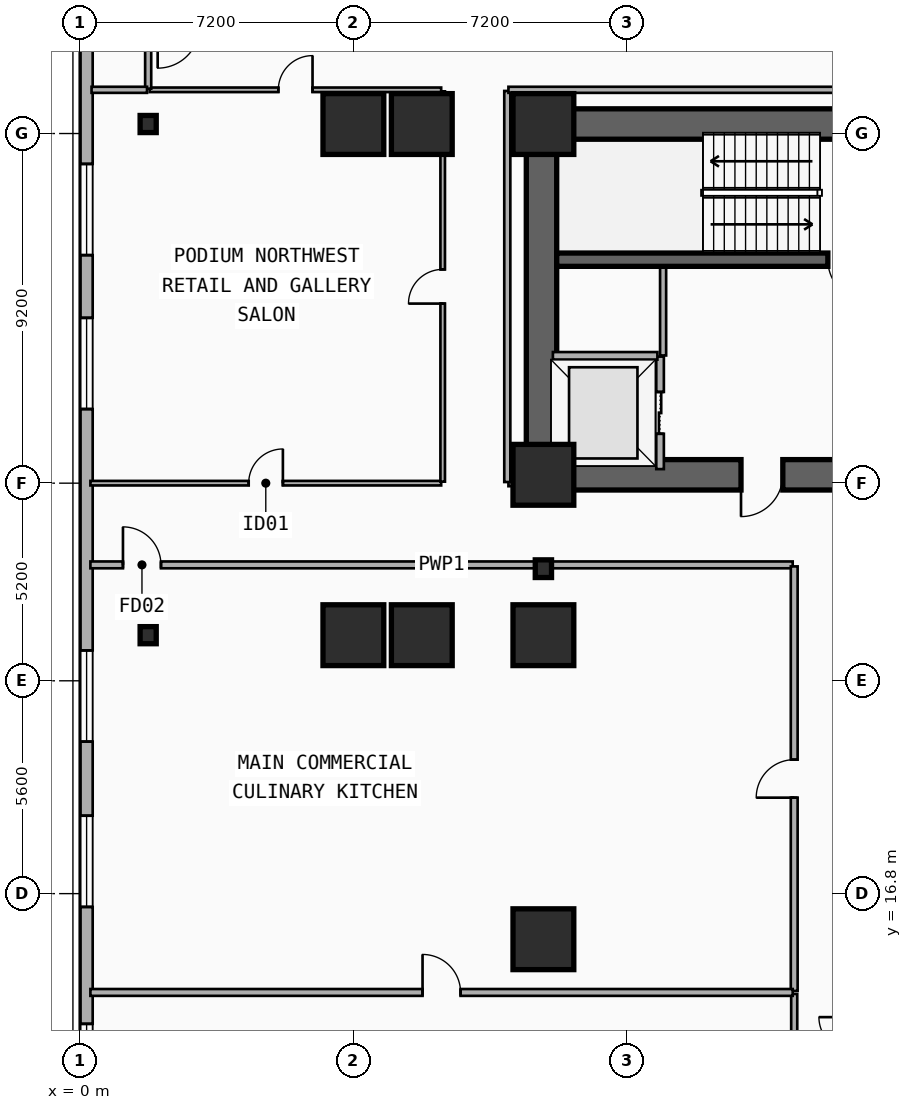
"""IFC4 building model, lengths in metres.
Left out: names, types, materials, properties, quantities, classifications, styles, units other than length and angle.
Written with IfcOpenShell. Run it as: python <this file> out.ifc"""

import sys

from ifc_helpers import new_model, si_unit, direction, frame, frame_2d, origin, origin_2d, place, context, subcontext, project, spatial, rectangle, i_section, extrude, element, fill, save


model = new_model("IFC4")
c1 = context("Model", 3, precision=1e-05, world=origin(), true_north=direction((0.0, 1.0)))
c2 = subcontext(c1, "Body", "Model", "MODEL_VIEW")
j1 = project(units=[si_unit("LENGTHUNIT", "METRE"), si_unit("PLANEANGLEUNIT", "RADIAN")], contexts=[c1])
p1 = place(None, origin())
s1 = spatial("IfcSite", under=j1, at=p1, CompositionType="ELEMENT")
p2 = place(p1, origin())
s2 = spatial("IfcBuilding", under=s1, at=p2, CompositionType="ELEMENT")
p3 = place(p2, frame((0.0, 0.0, 14.9)))
s3 = spatial("IfcBuildingStorey", under=s2, at=p3, CompositionType="ELEMENT", Elevation=14.9)
p4 = place(p3, frame((12.15, 37.05, 0.0), z_axis=(0.0, 0.0, 1.0), x_axis=(1.0, 0.0, 0.0)))
e1 = element("IfcWall", 1, at=p4, inside=s3, PredefinedType="SHEAR", context=c2, shape_type="SweptSolid", body=[
    extrude(rectangle(XDim=33.23, YDim=0.8, at=frame_2d((16.615, 0.0))), origin(), (0.0, 0.0, 1.0), 4.5),
])
p5 = place(p3, frame((21.18, 27.82, 0.0), z_axis=(0.0, 0.0, 1.0), x_axis=(-1.0, 0.0, 0.0)))
e2 = element("IfcWall", 2, at=p5, inside=s3, PredefinedType="SHEAR", context=c2, shape_type="SweptSolid", body=[
    extrude(rectangle(XDim=9.03, YDim=0.8, at=frame_2d((4.515, 0.0))), origin(), (0.0, 0.0, 1.0), 4.5),
])
p6 = place(p5, frame((2.68, 0.0, 0.0)))
e3 = element("IfcOpeningElement", 3, at=p6, cuts=e2, PredefinedType="OPENING", context=c2, shape_type="SweptSolid", body=[
    extrude(rectangle(XDim=1.1, YDim=2.15, at=frame_2d((0.55, 1.075))), frame((0.0, 0.41, 0.0), z_axis=(0.0, -1.0, 0.0), x_axis=(1.0, 0.0, 0.0)), (0.0, 0.0, 1.0), 0.82),
])
p7 = place(p3, frame((12.15, 28.22, 0.0), z_axis=(0.0, 0.0, 1.0), x_axis=(0.0, 1.0, 0.0)))
e4 = element("IfcWall", 4, at=p7, inside=s3, PredefinedType="SHEAR", context=c2, shape_type="SweptSolid", body=[
    extrude(rectangle(XDim=8.43, YDim=0.8, at=frame_2d((4.215, 0.0))), origin(), (0.0, 0.0, 1.0), 4.5),
])
p8 = place(p3, frame((21.005, 33.48, 0.0), z_axis=(0.0, 0.0, 1.0), x_axis=(-1.0, 0.0, 0.0)))
e5 = element("IfcWall", 5, at=p8, inside=s3, PredefinedType="SHEAR", context=c2, shape_type="SweptSolid", body=[
    extrude(rectangle(XDim=8.455, YDim=0.35, at=frame_2d((4.228, 0.0))), origin(), (0.0, 0.0, 1.0), 4.5),
])
p9 = place(p8, frame((0.22, 0.0, 0.0)))
e6 = element("IfcOpeningElement", 6, at=p9, cuts=e5, PredefinedType="OPENING", context=c2, shape_type="SweptSolid", body=[
    extrude(rectangle(XDim=1.1, YDim=2.15, at=frame_2d((0.55, 1.075))), frame((0.0, 0.185, 0.0), z_axis=(0.0, -1.0, 0.0), x_axis=(1.0, 0.0, 0.0)), (0.0, 0.0, 1.0), 0.37),
])
for number, where, z_axis, x_axis in (
    (7, (12.2, 27.82, 0.0), (0.0, 0.0, 1.0), (1.0, 0.0, 0.0)),
    (8, (12.2, 37.05, 0.0), (0.0, 0.0, 1.0), (1.0, 0.0, 0.0)),
):
    element("IfcColumn", number, at=place(p3, frame(where, z_axis=z_axis, x_axis=x_axis)), inside=s3, PredefinedType="COLUMN", context=c2, shape_type="SweptSolid", body=[
        extrude(rectangle(XDim=1.6, YDim=1.6, at=origin_2d()), origin(), (0.0, 0.0, 1.0), 4.5),
    ])
p10 = place(p3, frame((12.2, 25.35, 0.0), z_axis=(0.0, 0.0, 1.0), x_axis=(1.0, 0.0, 0.0)))
e9 = element("IfcColumn", 9, at=p10, inside=s3, PredefinedType="COLUMN", context=c2, shape_type="SweptSolid", body=[
    extrude(i_section(OverallWidth=0.428, OverallDepth=0.465, WebThickness=0.045, FlangeThickness=0.073, FilletRadius=0.015, at=origin_2d()), origin(), (0.0, 0.0, 1.0), 4.5),
])
for number, where, z_axis, x_axis in (
    (10, (1.8, 23.6, 0.0), (0.0, 0.0, 1.0), (1.0, 0.0, 0.0)),
    (11, (1.8, 37.05, 0.0), (0.0, 0.0, 1.0), (1.0, 0.0, 0.0)),
):
    element("IfcColumn", number, at=place(p3, frame(where, z_axis=z_axis, x_axis=x_axis)), inside=s3, PredefinedType="COLUMN", context=c2, shape_type="SweptSolid", body=[
        extrude(i_section(OverallWidth=0.424, OverallDepth=0.45, WebThickness=0.041, FlangeThickness=0.065, FilletRadius=0.015, at=origin_2d()), origin(), (0.0, 0.0, 1.0), 4.5),
    ])
for number, where, z_axis, x_axis in (
    (12, (7.2, 23.6, 0.0), (0.0, 0.0, 1.0), (1.0, 0.0, 0.0)),
    (13, (7.2, 37.05, 0.0), (0.0, 0.0, 1.0), (1.0, 0.0, 0.0)),
    (14, (9.0, 23.6, 0.0), (0.0, 0.0, 1.0), (1.0, 0.0, 0.0)),
    (15, (9.0, 37.05, 0.0), (0.0, 0.0, 1.0), (1.0, 0.0, 0.0)),
    (16, (12.2, 15.6, 0.0), (0.0, 0.0, 1.0), (1.0, 0.0, 0.0)),
    (17, (12.2, 23.6, 0.0), (0.0, 0.0, 1.0), (1.0, 0.0, 0.0)),
):
    element("IfcColumn", number, at=place(p3, frame(where, z_axis=z_axis, x_axis=x_axis)), inside=s3, PredefinedType="COLUMN", context=c2, shape_type="SweptSolid", body=[
        extrude(rectangle(XDim=1.6, YDim=1.6, at=origin_2d()), origin(), (0.0, 0.0, 1.0), 4.5),
    ])
p11 = place(p3, frame((0.18, 7.2, 0.0), z_axis=(0.0, 0.0, 1.0), x_axis=(0.0, 1.0, 0.0)))
e18 = element("IfcWall", 18, at=p11, inside=s3, PredefinedType="SOLIDWALL", context=c2, shape_type="SweptSolid", body=[
    extrude(rectangle(XDim=34.4, YDim=0.32, at=frame_2d((17.2, 0.0))), origin(), (0.0, 0.0, 1.0), 4.2),
])
p12 = place(p11, frame((22.35, 0.0, 0.9)))
e19 = element("IfcOpeningElement", 19, at=p12, cuts=e18, PredefinedType="OPENING", context=c2, shape_type="SweptSolid", body=[
    extrude(rectangle(XDim=2.4, YDim=1.8, at=frame_2d((1.2, 0.9))), frame((0.0, 0.17, 0.0), z_axis=(0.0, -1.0, 0.0), x_axis=(1.0, 0.0, 0.0)), (0.0, 0.0, 1.0), 0.34),
])
p13 = place(p11, frame((26.4, 0.0, 0.9)))
e20 = element("IfcOpeningElement", 20, at=p13, cuts=e18, PredefinedType="OPENING", context=c2, shape_type="SweptSolid", body=[
    extrude(rectangle(XDim=2.4, YDim=1.8, at=frame_2d((1.2, 0.9))), frame((0.0, 0.17, 0.0), z_axis=(0.0, -1.0, 0.0), x_axis=(1.0, 0.0, 0.0)), (0.0, 0.0, 1.0), 0.34),
])
p14 = place(p11, frame((0.847, 0.0, 0.9)))
e21 = element("IfcOpeningElement", 21, at=p14, cuts=e18, PredefinedType="OPENING", context=c2, shape_type="SweptSolid", body=[
    extrude(rectangle(XDim=2.4, YDim=1.8, at=frame_2d((1.2, 0.9))), frame((0.0, 0.17, 0.0), z_axis=(0.0, -1.0, 0.0), x_axis=(1.0, 0.0, 0.0)), (0.0, 0.0, 1.0), 0.34),
])
p15 = place(p11, frame((3.773, 0.0, 0.9)))
e22 = element("IfcOpeningElement", 22, at=p15, cuts=e18, PredefinedType="OPENING", context=c2, shape_type="SweptSolid", body=[
    extrude(rectangle(XDim=2.4, YDim=1.8, at=frame_2d((1.2, 0.9))), frame((0.0, 0.17, 0.0), z_axis=(0.0, -1.0, 0.0), x_axis=(1.0, 0.0, 0.0)), (0.0, 0.0, 1.0), 0.34),
])
p16 = place(p11, frame((9.25, 0.0, 0.9)))
e23 = element("IfcOpeningElement", 23, at=p16, cuts=e18, PredefinedType="OPENING", context=c2, shape_type="SweptSolid", body=[
    extrude(rectangle(XDim=2.4, YDim=1.8, at=frame_2d((1.2, 0.9))), frame((0.0, 0.17, 0.0), z_axis=(0.0, -1.0, 0.0), x_axis=(1.0, 0.0, 0.0)), (0.0, 0.0, 1.0), 0.34),
])
p17 = place(p11, frame((13.6, 0.0, 0.9)))
e24 = element("IfcOpeningElement", 24, at=p17, cuts=e18, PredefinedType="OPENING", context=c2, shape_type="SweptSolid", body=[
    extrude(rectangle(XDim=2.4, YDim=1.8, at=frame_2d((1.2, 0.9))), frame((0.0, 0.17, 0.0), z_axis=(0.0, -1.0, 0.0), x_axis=(1.0, 0.0, 0.0)), (0.0, 0.0, 1.0), 0.34),
])
p18 = place(p3, frame((15.27, 27.97, 0.0), z_axis=(0.0, 0.0, 1.0), x_axis=(0.0, 1.0, 0.0)))
e25 = element("IfcWall", 25, at=p18, inside=s3, PredefinedType="PARTITIONING", context=c2, shape_type="SweptSolid", body=[
    extrude(rectangle(XDim=2.96, YDim=0.2, at=frame_2d((1.48, 0.0))), origin(), (0.0, 0.0, 1.0), 3.172),
])
p19 = place(p18, frame((0.93, 0.0, 0.0)))
e26 = element("IfcOpeningElement", 26, at=p19, cuts=e25, PredefinedType="OPENING", context=c2, shape_type="SweptSolid", body=[
    extrude(rectangle(XDim=1.1, YDim=2.15, at=frame_2d((0.55, 1.075))), frame((0.0, 0.11, 0.0), z_axis=(0.0, -1.0, 0.0), x_axis=(1.0, 0.0, 0.0)), (0.0, 0.0, 1.0), 0.22),
])
p20 = place(p3, frame((12.45, 30.95, 0.0), z_axis=(0.0, 0.0, 1.0), x_axis=(1.0, 0.0, 0.0)))
e27 = element("IfcWall", 27, at=p20, inside=s3, PredefinedType="PARTITIONING", context=c2, shape_type="SweptSolid", body=[
    extrude(rectangle(XDim=2.75, YDim=0.2, at=frame_2d((1.375, 0.0))), origin(), (0.0, 0.0, 1.0), 3.172),
])
p21 = place(p3, frame((0.28, 27.6, 0.0), z_axis=(0.0, 0.0, 1.0), x_axis=(1.0, 0.0, 0.0)))
e28 = element("IfcWall", 28, at=p21, inside=s3, PredefinedType="PARTITIONING", context=c2, shape_type="SweptSolid", body=[
    extrude(rectangle(XDim=9.23, YDim=0.12, at=frame_2d((4.615, 0.0))), origin(), (0.0, 0.0, 1.0), 4.2),
])
p22 = place(p21, frame((4.165, 0.0, 0.0)))
e29 = element("IfcOpeningElement", 29, at=p22, cuts=e28, PredefinedType="OPENING", context=c2, shape_type="SweptSolid", body=[
    extrude(rectangle(XDim=0.9, YDim=2.1, at=frame_2d((0.45, 1.05))), frame((0.0, 0.07, 0.0), z_axis=(0.0, -1.0, 0.0), x_axis=(1.0, 0.0, 0.0)), (0.0, 0.0, 1.0), 0.14),
])
p23 = place(p3, frame((0.28, 25.45, 0.0), z_axis=(0.0, 0.0, 1.0), x_axis=(1.0, 0.0, 0.0)))
e30 = element("IfcWall", 30, at=p23, inside=s3, PredefinedType="PLUMBINGWALL", context=c2, shape_type="SweptSolid", body=[
    extrude(rectangle(XDim=18.48, YDim=0.18, at=frame_2d((9.24, 0.0))), origin(), (0.0, 0.0, 1.0), 3.366),
])
p24 = place(p23, frame((0.857, 0.0, 0.0)))
e31 = element("IfcOpeningElement", 31, at=p24, cuts=e30, PredefinedType="OPENING", context=c2, shape_type="SweptSolid", body=[
    extrude(rectangle(XDim=1.0, YDim=2.15, at=frame_2d((0.5, 1.075))), frame((0.0, 0.1, 0.0), z_axis=(0.0, -1.0, 0.0), x_axis=(1.0, 0.0, 0.0)), (0.0, 0.0, 1.0), 0.2),
])
p25 = place(p3, frame((9.55, 27.64, 0.0), z_axis=(0.0, 0.0, 1.0), x_axis=(0.0, 1.0, 0.0)))
e32 = element("IfcWall", 32, at=p25, inside=s3, PredefinedType="PARTITIONING", context=c2, shape_type="SweptSolid", body=[
    extrude(rectangle(XDim=10.27, YDim=0.12, at=frame_2d((5.135, 0.0))), origin(), (0.0, 0.0, 1.0), 4.2),
])
p26 = place(p25, frame((4.685, 0.0, 0.0)))
e33 = element("IfcOpeningElement", 33, at=p26, cuts=e32, PredefinedType="OPENING", context=c2, shape_type="SweptSolid", body=[
    extrude(rectangle(XDim=0.9, YDim=2.1, at=frame_2d((0.45, 1.05))), frame((0.0, 0.07, 0.0), z_axis=(0.0, -1.0, 0.0), x_axis=(1.0, 0.0, 0.0)), (0.0, 0.0, 1.0), 0.14),
])
p27 = place(p3, frame((1.84, 37.95, 0.0), z_axis=(0.0, 0.0, 1.0), x_axis=(1.0, 0.0, 0.0)))
e34 = element("IfcWall", 34, at=p27, inside=s3, PredefinedType="PARTITIONING", context=c2, shape_type="SweptSolid", body=[
    extrude(rectangle(XDim=7.67, YDim=0.12, at=frame_2d((3.835, 0.0))), origin(), (0.0, 0.0, 1.0), 4.2),
])
p28 = place(p27, frame((3.385, 0.0, 0.0)))
e35 = element("IfcOpeningElement", 35, at=p28, cuts=e34, PredefinedType="OPENING", context=c2, shape_type="SweptSolid", body=[
    extrude(rectangle(XDim=0.9, YDim=2.1, at=frame_2d((0.45, 1.05))), frame((0.0, 0.07, 0.0), z_axis=(0.0, -1.0, 0.0), x_axis=(1.0, 0.0, 0.0)), (0.0, 0.0, 1.0), 0.14),
])
p29 = place(p3, frame((18.8, 12.04, 0.0), z_axis=(0.0, 0.0, 1.0), x_axis=(0.0, 1.0, 0.0)))
e36 = element("IfcWall", 36, at=p29, inside=s3, PredefinedType="PARTITIONING", context=c2, shape_type="SweptSolid", body=[
    extrude(rectangle(XDim=2.12, YDim=0.16, at=frame_2d((1.06, 0.0))), origin(), (0.0, 0.0, 1.0), 3.82),
])
p30 = place(p3, frame((18.8, 14.24, 0.0), z_axis=(0.0, 0.0, 1.0), x_axis=(0.0, 1.0, 0.0)))
e37 = element("IfcWall", 37, at=p30, inside=s3, PredefinedType="PLUMBINGWALL", context=c2, shape_type="SweptSolid", body=[
    extrude(rectangle(XDim=11.17, YDim=0.18, at=frame_2d((5.585, 0.0))), origin(), (0.0, 0.0, 1.0), 3.172),
])
p31 = place(p30, frame((5.085, 0.0, 0.0)))
e38 = element("IfcOpeningElement", 38, at=p31, cuts=e37, PredefinedType="OPENING", context=c2, shape_type="SweptSolid", body=[
    extrude(rectangle(XDim=1.0, YDim=2.15, at=frame_2d((0.5, 1.075))), frame((0.0, 0.1, 0.0), z_axis=(0.0, -1.0, 0.0), x_axis=(1.0, 0.0, 0.0)), (0.0, 0.0, 1.0), 0.2),
])
p32 = place(p3, frame((0.28, 14.2, 0.0), z_axis=(0.0, 0.0, 1.0), x_axis=(1.0, 0.0, 0.0)))
e39 = element("IfcWall", 39, at=p32, inside=s3, PredefinedType="PLUMBINGWALL", context=c2, shape_type="SweptSolid", body=[
    extrude(rectangle(XDim=18.48, YDim=0.18, at=frame_2d((9.24, 0.0))), origin(), (0.0, 0.0, 1.0), 3.366),
])
p33 = place(p32, frame((8.74, 0.0, 0.0)))
e40 = element("IfcOpeningElement", 40, at=p33, cuts=e39, PredefinedType="OPENING", context=c2, shape_type="SweptSolid", body=[
    extrude(rectangle(XDim=1.0, YDim=2.15, at=frame_2d((0.5, 1.075))), frame((0.0, 0.1, 0.0), z_axis=(0.0, -1.0, 0.0), x_axis=(1.0, 0.0, 0.0)), (0.0, 0.0, 1.0), 0.2),
])
p34 = place(p3, frame((15.35, 30.96, 0.0), z_axis=(0.0, 0.0, 1.0), x_axis=(0.0, 1.0, 0.0)))
e41 = element("IfcWall", 41, at=p34, inside=s3, PredefinedType="PARTITIONING", context=c2, shape_type="SweptSolid", body=[
    extrude(rectangle(XDim=2.31, YDim=0.16, at=frame_2d((1.155, 0.0))), origin(), (0.0, 0.0, 1.0), 4.2),
])
p35 = place(p3, frame((11.28, 27.6, 0.0), z_axis=(0.0, 0.0, 1.0), x_axis=(1.0, 0.0, 0.0)))
e42 = element("IfcWall", 42, at=p35, inside=s3, PredefinedType="PARTITIONING", context=c2, shape_type="SweptSolid", body=[
    extrude(rectangle(XDim=0.84, YDim=0.16, at=frame_2d((0.42, 0.0))), origin(), (0.0, 0.0, 1.0), 3.172),
])
p36 = place(p3, frame((11.25, 27.63, 0.0), z_axis=(0.0, 0.0, 1.0), x_axis=(0.0, 1.0, 0.0)))
e43 = element("IfcWall", 43, at=p36, inside=s3, PredefinedType="PARTITIONING", context=c2, shape_type="SweptSolid", body=[
    extrude(rectangle(XDim=10.29, YDim=0.16, at=frame_2d((5.145, 0.0))), origin(), (0.0, 0.0, 1.0), 4.2),
])
p37 = place(p3, frame((11.28, 37.95, 0.0), z_axis=(0.0, 0.0, 1.0), x_axis=(1.0, 0.0, 0.0)))
e44 = element("IfcWall", 44, at=p37, inside=s3, PredefinedType="PARTITIONING", context=c2, shape_type="SweptSolid", body=[
    extrude(rectangle(XDim=35.04, YDim=0.16, at=frame_2d((17.52, 0.0))), origin(), (0.0, 0.0, 1.0), 3.53),
])
p38 = place(p3, frame((1.8, 37.98, 0.0), z_axis=(0.0, 0.0, 1.0), x_axis=(0.0, 1.0, 0.0)))
e45 = element("IfcWall", 45, at=p38, inside=s3, PredefinedType="PARTITIONING", context=c2, shape_type="SweptSolid", body=[
    extrude(rectangle(XDim=1.785, YDim=0.16, at=frame_2d((0.893, 0.0))), origin(), (0.0, 0.0, 1.0), 4.2),
])
p39 = place(p3, frame((0.31, 37.95, 0.0), z_axis=(0.0, 0.0, 1.0), x_axis=(1.0, 0.0, 0.0)))
e46 = element("IfcWall", 46, at=p39, inside=s3, PredefinedType="PARTITIONING", context=c2, shape_type="SweptSolid", body=[
    extrude(rectangle(XDim=1.46, YDim=0.16, at=frame_2d((0.73, 0.0))), origin(), (0.0, 0.0, 1.0), 4.2),
])
p40 = place(p12, origin())
e47 = element("IfcWindow", 47, at=p40, inside=s3, PartitioningType="SINGLE_PANEL", PredefinedType="WINDOW", context=c2, shape_type="SweptSolid", body=[
    extrude(rectangle(XDim=2.4, YDim=1.8, at=frame_2d((1.2, 0.9))), frame((0.0, 0.03, 0.0), z_axis=(0.0, -1.0, 0.0), x_axis=(1.0, 0.0, 0.0)), (0.0, 0.0, 1.0), 0.06),
])
fill(e19, e47)
p41 = place(p13, origin())
e48 = element("IfcWindow", 48, at=p41, inside=s3, PartitioningType="SINGLE_PANEL", PredefinedType="WINDOW", context=c2, shape_type="SweptSolid", body=[
    extrude(rectangle(XDim=2.4, YDim=1.8, at=frame_2d((1.2, 0.9))), frame((0.0, 0.03, 0.0), z_axis=(0.0, -1.0, 0.0), x_axis=(1.0, 0.0, 0.0)), (0.0, 0.0, 1.0), 0.06),
])
fill(e20, e48)
p42 = place(p15, origin())
e49 = element("IfcWindow", 49, at=p42, inside=s3, PartitioningType="SINGLE_PANEL", PredefinedType="WINDOW", context=c2, shape_type="SweptSolid", body=[
    extrude(rectangle(XDim=2.4, YDim=1.8, at=frame_2d((1.2, 0.9))), frame((0.0, 0.03, 0.0), z_axis=(0.0, -1.0, 0.0), x_axis=(1.0, 0.0, 0.0)), (0.0, 0.0, 1.0), 0.06),
])
fill(e22, e49)
p43 = place(p16, origin())
e50 = element("IfcWindow", 50, at=p43, inside=s3, PartitioningType="SINGLE_PANEL", PredefinedType="WINDOW", context=c2, shape_type="SweptSolid", body=[
    extrude(rectangle(XDim=2.4, YDim=1.8, at=frame_2d((1.2, 0.9))), frame((0.0, 0.03, 0.0), z_axis=(0.0, -1.0, 0.0), x_axis=(1.0, 0.0, 0.0)), (0.0, 0.0, 1.0), 0.06),
])
fill(e23, e50)
p44 = place(p17, origin())
e51 = element("IfcWindow", 51, at=p44, inside=s3, PartitioningType="SINGLE_PANEL", PredefinedType="WINDOW", context=c2, shape_type="SweptSolid", body=[
    extrude(rectangle(XDim=2.4, YDim=1.8, at=frame_2d((1.2, 0.9))), frame((0.0, 0.03, 0.0), z_axis=(0.0, -1.0, 0.0), x_axis=(1.0, 0.0, 0.0)), (0.0, 0.0, 1.0), 0.06),
])
fill(e24, e51)
p45 = place(p19, origin())
e52 = element("IfcDoor", 52, at=p45, inside=s3, OperationType="DOUBLE_DOOR_SLIDING", PredefinedType="DOOR", context=c2, shape_type="SweptSolid", body=[
    extrude(rectangle(XDim=1.1, YDim=2.15, at=frame_2d((0.55, 1.075))), frame((0.0, 0.025, 0.0), z_axis=(0.0, -1.0, 0.0), x_axis=(1.0, 0.0, 0.0)), (0.0, 0.0, 1.0), 0.05),
])
fill(e26, e52)
p46 = place(p9, origin())
e53 = element("IfcDoor", 53, at=p46, inside=s3, OperationType="SINGLE_SWING_LEFT", PredefinedType="DOOR", context=c2, shape_type="SweptSolid", body=[
    extrude(rectangle(XDim=1.1, YDim=2.15, at=frame_2d((0.55, 1.075))), frame((0.0, 0.025, 0.0), z_axis=(0.0, -1.0, 0.0), x_axis=(1.0, 0.0, 0.0)), (0.0, 0.0, 1.0), 0.05),
])
fill(e6, e53)
p47 = place(p6, origin())
e54 = element("IfcDoor", 54, at=p47, inside=s3, OperationType="SINGLE_SWING_RIGHT", PredefinedType="DOOR", context=c2, shape_type="SweptSolid", body=[
    extrude(rectangle(XDim=1.1, YDim=2.15, at=frame_2d((0.55, 1.075))), frame((0.0, 0.025, 0.0), z_axis=(0.0, -1.0, 0.0), x_axis=(1.0, 0.0, 0.0)), (0.0, 0.0, 1.0), 0.05),
])
fill(e3, e54)
p48 = place(p22, origin())
e55 = element("IfcDoor", 55, at=p48, inside=s3, OperationType="SINGLE_SWING_RIGHT", PredefinedType="DOOR", context=c2, shape_type="SweptSolid", body=[
    extrude(rectangle(XDim=0.9, YDim=2.1, at=frame_2d((0.45, 1.05))), frame((0.0, 0.025, 0.0), z_axis=(0.0, -1.0, 0.0), x_axis=(1.0, 0.0, 0.0)), (0.0, 0.0, 1.0), 0.05),
])
fill(e29, e55)
p49 = place(p24, origin())
e56 = element("IfcDoor", 56, at=p49, inside=s3, OperationType="SINGLE_SWING_LEFT", PredefinedType="DOOR", context=c2, shape_type="SweptSolid", body=[
    extrude(rectangle(XDim=1.0, YDim=2.15, at=frame_2d((0.5, 1.075))), frame((0.0, 0.025, 0.0), z_axis=(0.0, -1.0, 0.0), x_axis=(1.0, 0.0, 0.0)), (0.0, 0.0, 1.0), 0.05),
])
fill(e31, e56)
p50 = place(p26, origin())
e57 = element("IfcDoor", 57, at=p50, inside=s3, OperationType="SINGLE_SWING_LEFT", PredefinedType="DOOR", context=c2, shape_type="SweptSolid", body=[
    extrude(rectangle(XDim=0.9, YDim=2.1, at=frame_2d((0.45, 1.05))), frame((0.0, 0.025, 0.0), z_axis=(0.0, -1.0, 0.0), x_axis=(1.0, 0.0, 0.0)), (0.0, 0.0, 1.0), 0.05),
])
fill(e33, e57)
p51 = place(p28, origin())
e58 = element("IfcDoor", 58, at=p51, inside=s3, OperationType="SINGLE_SWING_RIGHT", PredefinedType="DOOR", context=c2, shape_type="SweptSolid", body=[
    extrude(rectangle(XDim=0.9, YDim=2.1, at=frame_2d((0.45, 1.05))), frame((0.0, 0.025, 0.0), z_axis=(0.0, -1.0, 0.0), x_axis=(1.0, 0.0, 0.0)), (0.0, 0.0, 1.0), 0.05),
])
fill(e35, e58)
p52 = place(p31, origin())
e59 = element("IfcDoor", 59, at=p52, inside=s3, OperationType="SINGLE_SWING_LEFT", PredefinedType="DOOR", context=c2, shape_type="SweptSolid", body=[
    extrude(rectangle(XDim=1.0, YDim=2.15, at=frame_2d((0.5, 1.075))), frame((0.0, 0.025, 0.0), z_axis=(0.0, -1.0, 0.0), x_axis=(1.0, 0.0, 0.0)), (0.0, 0.0, 1.0), 0.05),
])
fill(e38, e59)
p53 = place(p33, origin())
e60 = element("IfcDoor", 60, at=p53, inside=s3, OperationType="SINGLE_SWING_LEFT", PredefinedType="DOOR", context=c2, shape_type="SweptSolid", body=[
    extrude(rectangle(XDim=1.0, YDim=2.15, at=frame_2d((0.5, 1.075))), frame((0.0, 0.025, 0.0), z_axis=(0.0, -1.0, 0.0), x_axis=(1.0, 0.0, 0.0)), (0.0, 0.0, 1.0), 0.05),
])
fill(e40, e60)
save(model, sys.argv[1])
